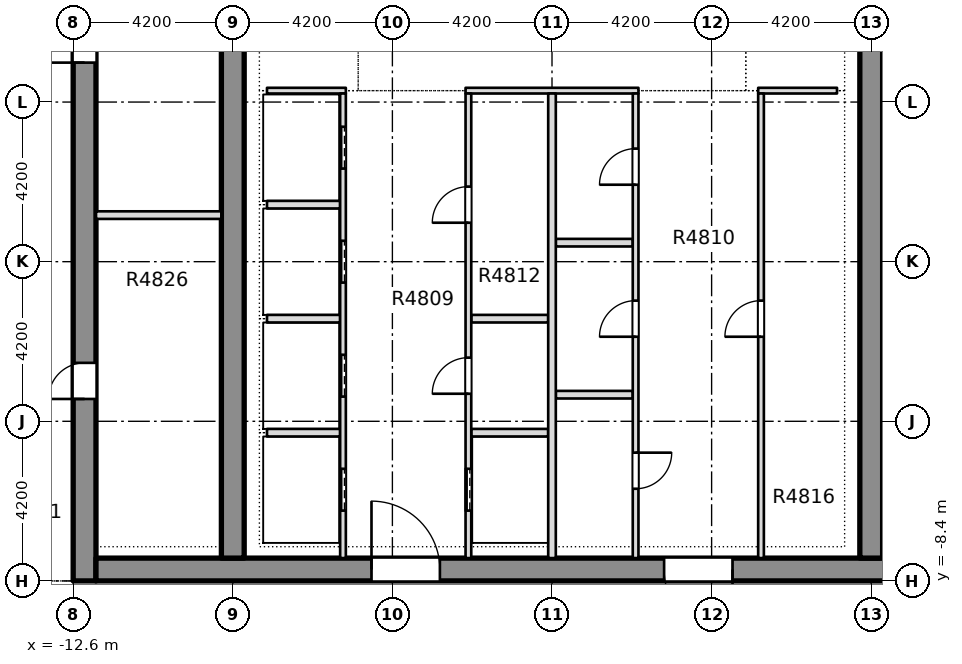
"""IFC4 building model, lengths in metres.
Left out: names, types, materials, properties, quantities, classifications, styles, units other than length and angle.
Written with IfcOpenShell. Run it as: python <this file> out.ifc"""

import sys

from ifc_helpers import new_model, si_unit, direction, frame, frame_2d, origin, place, context, subcontext, project, spatial, rectangle, extrude, element, fill, save


model = new_model("IFC4")
c1 = context("Model", 3, precision=1e-05, world=origin(), true_north=direction((0.0, 1.0)))
c2 = subcontext(c1, "Body", "Model", "MODEL_VIEW")
j1 = project(units=[si_unit("LENGTHUNIT", "METRE"), si_unit("PLANEANGLEUNIT", "RADIAN")], contexts=[c1])
p1 = place(None, origin())
s1 = spatial("IfcSite", under=j1, at=p1, CompositionType="ELEMENT")
p2 = place(p1, origin())
s2 = spatial("IfcBuilding", under=s1, at=p2, CompositionType="ELEMENT")
p3 = place(p2, frame((0.0, 0.0, 185.9)))
s3 = spatial("IfcBuildingStorey", under=s2, at=p3, CompositionType="ELEMENT", Elevation=185.9)
p4 = place(p3, frame((-12.3, -8.4, -0.4), z_axis=(0.0, 0.0, 1.0), x_axis=(0.0, 1.0, 0.0)))
e1 = element("IfcWall", 1, at=p4, inside=s3, PredefinedType="SHEAR", context=c2, shape_type="SweptSolid", body=[
    extrude(rectangle(XDim=30.15, YDim=0.6, at=frame_2d((15.075, 0.0))), origin(), (0.0, 0.0, 1.0), 3.45),
])
p5 = place(p4, frame((4.788, 0.0, 0.4)))
e2 = element("IfcOpeningElement", 2, at=p5, cuts=e1, PredefinedType="OPENING", context=c2, shape_type="SweptSolid", body=[
    extrude(rectangle(XDim=0.95, YDim=2.1, at=frame_2d((0.475, 1.05))), frame((0.0, 0.31, 0.0), z_axis=(0.0, -1.0, 0.0), x_axis=(1.0, 0.0, 0.0)), (0.0, 0.0, 1.0), 0.62),
])
p6 = place(p4, frame((13.638, 0.0, 0.4)))
e3 = element("IfcOpeningElement", 3, at=p6, cuts=e1, PredefinedType="OPENING", context=c2, shape_type="SweptSolid", body=[
    extrude(rectangle(XDim=0.95, YDim=2.1, at=frame_2d((0.475, 1.05))), frame((0.0, 0.31, 0.0), z_axis=(0.0, -1.0, 0.0), x_axis=(1.0, 0.0, 0.0)), (0.0, 0.0, 1.0), 0.62),
])
p7 = place(p4, frame((21.771, 0.0, 0.4)))
e4 = element("IfcOpeningElement", 4, at=p7, cuts=e1, PredefinedType="OPENING", context=c2, shape_type="SweptSolid", body=[
    extrude(rectangle(XDim=0.95, YDim=2.1, at=frame_2d((0.475, 1.05))), frame((0.0, 0.31, 0.0), z_axis=(0.0, -1.0, 0.0), x_axis=(1.0, 0.0, 0.0)), (0.0, 0.0, 1.0), 0.62),
])
p8 = place(p4, frame((24.576, 0.0, 0.4)))
e5 = element("IfcOpeningElement", 5, at=p8, cuts=e1, PredefinedType="OPENING", context=c2, shape_type="SweptSolid", body=[
    extrude(rectangle(XDim=0.95, YDim=2.1, at=frame_2d((0.475, 1.05))), frame((0.0, 0.31, 0.0), z_axis=(0.0, -1.0, 0.0), x_axis=(1.0, 0.0, 0.0)), (0.0, 0.0, 1.0), 0.62),
])
p9 = place(p4, frame((27.555, 0.0, 0.4)))
e6 = element("IfcOpeningElement", 6, at=p9, cuts=e1, PredefinedType="OPENING", context=c2, shape_type="SweptSolid", body=[
    extrude(rectangle(XDim=0.95, YDim=2.1, at=frame_2d((0.475, 1.05))), frame((0.0, 0.31, 0.0), z_axis=(0.0, -1.0, 0.0), x_axis=(1.0, 0.0, 0.0)), (0.0, 0.0, 1.0), 0.62),
])
p10 = place(p4, frame((19.3, 0.0, 0.4)))
e7 = element("IfcOpeningElement", 7, at=p10, cuts=e1, PredefinedType="OPENING", context=c2, shape_type="SweptSolid", body=[
    extrude(rectangle(XDim=1.2, YDim=2.1, at=frame_2d((0.6, 1.05))), frame((0.0, 0.31, 0.0), z_axis=(0.0, -1.0, 0.0), x_axis=(1.0, 0.0, 0.0)), (0.0, 0.0, 1.0), 0.62),
])
p11 = place(p3, frame((-12.0, -8.1, -0.4), z_axis=(0.0, 0.0, 1.0), x_axis=(1.0, 0.0, 0.0)))
e8 = element("IfcWall", 8, at=p11, inside=s3, PredefinedType="SHEAR", context=c2, shape_type="SweptSolid", body=[
    extrude(rectangle(XDim=24.0, YDim=0.6, at=frame_2d((12.0, 0.0))), origin(), (0.0, 0.0, 1.0), 3.45),
])
p12 = place(p11, frame((7.25, 0.0, 0.4)))
e9 = element("IfcOpeningElement", 9, at=p12, cuts=e8, PredefinedType="OPENING", context=c2, shape_type="SweptSolid", body=[
    extrude(rectangle(XDim=1.8, YDim=2.1, at=frame_2d((0.9, 1.05))), frame((0.0, 0.31, 0.0), z_axis=(0.0, -1.0, 0.0), x_axis=(1.0, 0.0, 0.0)), (0.0, 0.0, 1.0), 0.62),
])
p13 = place(p11, frame((14.95, 0.0, 0.4)))
e10 = element("IfcOpeningElement", 10, at=p13, cuts=e8, PredefinedType="OPENING", context=c2, shape_type="SweptSolid", body=[
    extrude(rectangle(XDim=1.8, YDim=2.1, at=frame_2d((0.9, 1.05))), frame((0.0, 0.31, 0.0), z_axis=(0.0, -1.0, 0.0), x_axis=(1.0, 0.0, 0.0)), (0.0, 0.0, 1.0), 0.62),
])
p14 = place(p3, frame((-8.4, -7.8, -0.4), z_axis=(0.0, 0.0, 1.0), x_axis=(0.0, 1.0, 0.0)))
e11 = element("IfcWall", 11, at=p14, inside=s3, PredefinedType="SHEAR", context=c2, shape_type="SweptSolid", body=[
    extrude(rectangle(XDim=28.95, YDim=0.6, at=frame_2d((14.475, 0.0))), origin(), (0.0, 0.0, 1.0), 3.45),
])
p15 = place(p14, frame((18.7, 0.0, 0.4)))
e12 = element("IfcOpeningElement", 12, at=p15, cuts=e11, PredefinedType="OPENING", context=c2, shape_type="SweptSolid", body=[
    extrude(rectangle(XDim=1.2, YDim=2.1, at=frame_2d((0.6, 1.05))), frame((0.0, 0.31, 0.0), z_axis=(0.0, -1.0, 0.0), x_axis=(1.0, 0.0, 0.0)), (0.0, 0.0, 1.0), 0.62),
])
p16 = place(p3, frame((8.4, -7.8, -0.4), z_axis=(0.0, 0.0, 1.0), x_axis=(0.0, 1.0, 0.0)))
e13 = element("IfcWall", 13, at=p16, inside=s3, PredefinedType="SHEAR", context=c2, shape_type="SweptSolid", body=[
    extrude(rectangle(XDim=28.95, YDim=0.6, at=frame_2d((14.475, 0.0))), origin(), (0.0, 0.0, 1.0), 3.45),
])
p17 = place(p16, frame((18.7, 0.0, 0.4)))
e14 = element("IfcOpeningElement", 14, at=p17, cuts=e13, PredefinedType="OPENING", context=c2, shape_type="SweptSolid", body=[
    extrude(rectangle(XDim=1.2, YDim=2.1, at=frame_2d((0.6, 1.05))), frame((0.0, 0.31, 0.0), z_axis=(0.0, -1.0, 0.0), x_axis=(1.0, 0.0, 0.0)), (0.0, 0.0, 1.0), 0.62),
])
p18 = place(p3, frame((-7.5, -4.5, 0.0), z_axis=(0.0, 0.0, 1.0), x_axis=(1.0, 0.0, 0.0)))
e15 = element("IfcWall", 15, at=p18, inside=s3, PredefinedType="PARTITIONING", context=c2, shape_type="SweptSolid", body=[
    extrude(rectangle(XDim=1.925, YDim=0.2, at=frame_2d((0.962, 0.0))), origin(), (0.0, 0.0, 1.0), 3.05),
])
for number, where, z_axis, x_axis in (
    (16, (-2.125, -4.5, 0.0), (0.0, 0.0, 1.0), (1.0, 0.0, 0.0)),
    (17, (0.1, -3.5, 0.0), (0.0, 0.0, 1.0), (1.0, 0.0, 0.0)),
):
    element("IfcWall", number, at=place(p3, frame(where, z_axis=z_axis, x_axis=x_axis)), inside=s3, PredefinedType="PARTITIONING", context=c2, shape_type="SweptSolid", body=[
        extrude(rectangle(XDim=2.025, YDim=0.2, at=frame_2d((1.012, 0.0))), origin(), (0.0, 0.0, 1.0), 3.05),
    ])
p19 = place(p3, frame((-7.5, -1.5, 0.0), z_axis=(0.0, 0.0, 1.0), x_axis=(1.0, 0.0, 0.0)))
e18 = element("IfcWall", 18, at=p19, inside=s3, PredefinedType="PARTITIONING", context=c2, shape_type="SweptSolid", body=[
    extrude(rectangle(XDim=1.925, YDim=0.2, at=frame_2d((0.962, 0.0))), origin(), (0.0, 0.0, 1.0), 3.05),
])
for number, where, z_axis, x_axis in (
    (19, (-2.125, -1.5, 0.0), (0.0, 0.0, 1.0), (1.0, 0.0, 0.0)),
    (20, (0.1, 0.5, 0.0), (0.0, 0.0, 1.0), (1.0, 0.0, 0.0)),
):
    element("IfcWall", number, at=place(p3, frame(where, z_axis=z_axis, x_axis=x_axis)), inside=s3, PredefinedType="PARTITIONING", context=c2, shape_type="SweptSolid", body=[
        extrude(rectangle(XDim=2.025, YDim=0.2, at=frame_2d((1.012, 0.0))), origin(), (0.0, 0.0, 1.0), 3.05),
    ])
p20 = place(p3, frame((-7.5, 1.5, 0.0), z_axis=(0.0, 0.0, 1.0), x_axis=(1.0, 0.0, 0.0)))
e21 = element("IfcWall", 21, at=p20, inside=s3, PredefinedType="PARTITIONING", context=c2, shape_type="SweptSolid", body=[
    extrude(rectangle(XDim=1.925, YDim=0.2, at=frame_2d((0.962, 0.0))), origin(), (0.0, 0.0, 1.0), 3.05),
])
p21 = place(p3, frame((-7.5, 4.5, 0.0), z_axis=(0.0, 0.0, 1.0), x_axis=(1.0, 0.0, 0.0)))
e22 = element("IfcWall", 22, at=p21, inside=s3, PredefinedType="PARTITIONING", context=c2, shape_type="SweptSolid", body=[
    extrude(rectangle(XDim=2.075, YDim=0.15, at=frame_2d((1.038, 0.0))), origin(), (0.0, 0.0, 1.0), 3.05),
])
p22 = place(p3, frame((-2.275, 4.5, 0.0), z_axis=(0.0, 0.0, 1.0), x_axis=(1.0, 0.0, 0.0)))
e23 = element("IfcWall", 23, at=p22, inside=s3, PredefinedType="PARTITIONING", context=c2, shape_type="SweptSolid", body=[
    extrude(rectangle(XDim=4.55, YDim=0.15, at=frame_2d((2.275, 0.0))), origin(), (0.0, 0.0, 1.0), 3.05),
])
p23 = place(p3, frame((5.425, 4.5, 0.0), z_axis=(0.0, 0.0, 1.0), x_axis=(1.0, 0.0, 0.0)))
e24 = element("IfcWall", 24, at=p23, inside=s3, PredefinedType="PARTITIONING", context=c2, shape_type="SweptSolid", body=[
    extrude(rectangle(XDim=2.075, YDim=0.15, at=frame_2d((1.038, 0.0))), origin(), (0.0, 0.0, 1.0), 3.05),
])
p24 = place(p3, frame((-5.5, -7.799, 0.0), z_axis=(0.0, 0.0, 1.0), x_axis=(0.0, 1.0, 0.0)))
e25 = element("IfcWall", 25, at=p24, inside=s3, PredefinedType="PARTITIONING", context=c2, shape_type="SweptSolid", body=[
    extrude(rectangle(XDim=12.224, YDim=0.15, at=frame_2d((6.112, 0.0))), origin(), (0.0, 0.0, 1.0), 3.05),
])
p25 = place(p24, frame((1.249, 0.0, 0.0)))
e26 = element("IfcOpeningElement", 26, at=p25, cuts=e25, PredefinedType="OPENING", context=c2, shape_type="SweptSolid", body=[
    extrude(rectangle(XDim=1.1, YDim=2.1, at=frame_2d((0.55, 1.05))), frame((0.0, 0.085, 0.0), z_axis=(0.0, -1.0, 0.0), x_axis=(1.0, 0.0, 0.0)), (0.0, 0.0, 1.0), 0.17),
])
p26 = place(p24, frame((4.249, 0.0, 0.0)))
e27 = element("IfcOpeningElement", 27, at=p26, cuts=e25, PredefinedType="OPENING", context=c2, shape_type="SweptSolid", body=[
    extrude(rectangle(XDim=1.1, YDim=2.1, at=frame_2d((0.55, 1.05))), frame((0.0, 0.085, 0.0), z_axis=(0.0, -1.0, 0.0), x_axis=(1.0, 0.0, 0.0)), (0.0, 0.0, 1.0), 0.17),
])
p27 = place(p24, frame((7.249, 0.0, 0.0)))
e28 = element("IfcOpeningElement", 28, at=p27, cuts=e25, PredefinedType="OPENING", context=c2, shape_type="SweptSolid", body=[
    extrude(rectangle(XDim=1.1, YDim=2.1, at=frame_2d((0.55, 1.05))), frame((0.0, 0.085, 0.0), z_axis=(0.0, -1.0, 0.0), x_axis=(1.0, 0.0, 0.0)), (0.0, 0.0, 1.0), 0.17),
])
p28 = place(p24, frame((10.249, 0.0, 0.0)))
e29 = element("IfcOpeningElement", 29, at=p28, cuts=e25, PredefinedType="OPENING", context=c2, shape_type="SweptSolid", body=[
    extrude(rectangle(XDim=1.1, YDim=2.1, at=frame_2d((0.55, 1.05))), frame((0.0, 0.085, 0.0), z_axis=(0.0, -1.0, 0.0), x_axis=(1.0, 0.0, 0.0)), (0.0, 0.0, 1.0), 0.17),
])
p29 = place(p3, frame((-2.2, -7.799, 0.0), z_axis=(0.0, 0.0, 1.0), x_axis=(0.0, 1.0, 0.0)))
e30 = element("IfcWall", 30, at=p29, inside=s3, PredefinedType="PARTITIONING", context=c2, shape_type="SweptSolid", body=[
    extrude(rectangle(XDim=12.224, YDim=0.15, at=frame_2d((6.112, 0.0))), origin(), (0.0, 0.0, 1.0), 3.05),
])
p30 = place(p29, frame((1.249, 0.0, 0.0)))
e31 = element("IfcOpeningElement", 31, at=p30, cuts=e30, PredefinedType="OPENING", context=c2, shape_type="SweptSolid", body=[
    extrude(rectangle(XDim=1.1, YDim=2.1, at=frame_2d((0.55, 1.05))), frame((0.0, 0.085, 0.0), z_axis=(0.0, -1.0, 0.0), x_axis=(1.0, 0.0, 0.0)), (0.0, 0.0, 1.0), 0.17),
])
p31 = place(p29, frame((4.324, 0.0, 0.0)))
e32 = element("IfcOpeningElement", 32, at=p31, cuts=e30, PredefinedType="OPENING", context=c2, shape_type="SweptSolid", body=[
    extrude(rectangle(XDim=0.95, YDim=2.1, at=frame_2d((0.475, 1.05))), frame((0.0, 0.085, 0.0), z_axis=(0.0, -1.0, 0.0), x_axis=(1.0, 0.0, 0.0)), (0.0, 0.0, 1.0), 0.17),
])
p32 = place(p29, frame((8.824, 0.0, 0.0)))
e33 = element("IfcOpeningElement", 33, at=p32, cuts=e30, PredefinedType="OPENING", context=c2, shape_type="SweptSolid", body=[
    extrude(rectangle(XDim=0.95, YDim=2.1, at=frame_2d((0.475, 1.05))), frame((0.0, 0.085, 0.0), z_axis=(0.0, -1.0, 0.0), x_axis=(1.0, 0.0, 0.0)), (0.0, 0.0, 1.0), 0.17),
])
p33 = place(p3, frame((0.0, -7.799, 0.0), z_axis=(0.0, 0.0, 1.0), x_axis=(0.0, 1.0, 0.0)))
e34 = element("IfcWall", 34, at=p33, inside=s3, PredefinedType="PARTITIONING", context=c2, shape_type="SweptSolid", body=[
    extrude(rectangle(XDim=12.224, YDim=0.2, at=frame_2d((6.112, 0.0))), origin(), (0.0, 0.0, 1.0), 3.05),
])
p34 = place(p3, frame((2.2, -7.799, 0.0), z_axis=(0.0, 0.0, 1.0), x_axis=(0.0, 1.0, 0.0)))
e35 = element("IfcWall", 35, at=p34, inside=s3, PredefinedType="PARTITIONING", context=c2, shape_type="SweptSolid", body=[
    extrude(rectangle(XDim=12.224, YDim=0.15, at=frame_2d((6.112, 0.0))), origin(), (0.0, 0.0, 1.0), 3.05),
])
p35 = place(p34, frame((1.824, 0.0, 0.0)))
e36 = element("IfcOpeningElement", 36, at=p35, cuts=e35, PredefinedType="OPENING", context=c2, shape_type="SweptSolid", body=[
    extrude(rectangle(XDim=0.95, YDim=2.1, at=frame_2d((0.475, 1.05))), frame((0.0, 0.085, 0.0), z_axis=(0.0, -1.0, 0.0), x_axis=(1.0, 0.0, 0.0)), (0.0, 0.0, 1.0), 0.17),
])
p36 = place(p34, frame((5.824, 0.0, 0.0)))
e37 = element("IfcOpeningElement", 37, at=p36, cuts=e35, PredefinedType="OPENING", context=c2, shape_type="SweptSolid", body=[
    extrude(rectangle(XDim=0.95, YDim=2.1, at=frame_2d((0.475, 1.05))), frame((0.0, 0.085, 0.0), z_axis=(0.0, -1.0, 0.0), x_axis=(1.0, 0.0, 0.0)), (0.0, 0.0, 1.0), 0.17),
])
p37 = place(p34, frame((9.824, 0.0, 0.0)))
e38 = element("IfcOpeningElement", 38, at=p37, cuts=e35, PredefinedType="OPENING", context=c2, shape_type="SweptSolid", body=[
    extrude(rectangle(XDim=0.95, YDim=2.1, at=frame_2d((0.475, 1.05))), frame((0.0, 0.085, 0.0), z_axis=(0.0, -1.0, 0.0), x_axis=(1.0, 0.0, 0.0)), (0.0, 0.0, 1.0), 0.17),
])
p38 = place(p3, frame((5.5, -7.799, 0.0), z_axis=(0.0, 0.0, 1.0), x_axis=(0.0, 1.0, 0.0)))
e39 = element("IfcWall", 39, at=p38, inside=s3, PredefinedType="PARTITIONING", context=c2, shape_type="SweptSolid", body=[
    extrude(rectangle(XDim=12.224, YDim=0.15, at=frame_2d((6.112, 0.0))), origin(), (0.0, 0.0, 1.0), 3.05),
])
p39 = place(p38, frame((5.824, 0.0, 0.0)))
e40 = element("IfcOpeningElement", 40, at=p39, cuts=e39, PredefinedType="OPENING", context=c2, shape_type="SweptSolid", body=[
    extrude(rectangle(XDim=0.95, YDim=2.1, at=frame_2d((0.475, 1.05))), frame((0.0, 0.085, 0.0), z_axis=(0.0, -1.0, 0.0), x_axis=(1.0, 0.0, 0.0)), (0.0, 0.0, 1.0), 0.17),
])
p40 = place(p3, frame((-11.999, 1.225, 0.0), z_axis=(0.0, 0.0, 1.0), x_axis=(1.0, 0.0, 0.0)))
e41 = element("IfcWall", 41, at=p40, inside=s3, PredefinedType="PARTITIONING", context=c2, shape_type="SweptSolid", body=[
    extrude(rectangle(XDim=3.298, YDim=0.2, at=frame_2d((1.649, 0.0))), origin(), (0.0, 0.0, 1.0), 3.05),
])
p41 = place(p25, origin())
e42 = element("IfcDoor", 42, at=p41, inside=s3, OperationType="SLIDING_TO_LEFT", PredefinedType="DOOR", context=c2, shape_type="SweptSolid", body=[
    extrude(rectangle(XDim=1.1, YDim=2.1, at=frame_2d((0.55, 1.05))), frame((0.0, 0.025, 0.0), z_axis=(0.0, -1.0, 0.0), x_axis=(1.0, 0.0, 0.0)), (0.0, 0.0, 1.0), 0.05),
])
fill(e26, e42)
p42 = place(p26, origin())
e43 = element("IfcDoor", 43, at=p42, inside=s3, OperationType="SLIDING_TO_LEFT", PredefinedType="DOOR", context=c2, shape_type="SweptSolid", body=[
    extrude(rectangle(XDim=1.1, YDim=2.1, at=frame_2d((0.55, 1.05))), frame((0.0, 0.025, 0.0), z_axis=(0.0, -1.0, 0.0), x_axis=(1.0, 0.0, 0.0)), (0.0, 0.0, 1.0), 0.05),
])
fill(e27, e43)
p43 = place(p27, origin())
e44 = element("IfcDoor", 44, at=p43, inside=s3, OperationType="SLIDING_TO_LEFT", PredefinedType="DOOR", context=c2, shape_type="SweptSolid", body=[
    extrude(rectangle(XDim=1.1, YDim=2.1, at=frame_2d((0.55, 1.05))), frame((0.0, 0.025, 0.0), z_axis=(0.0, -1.0, 0.0), x_axis=(1.0, 0.0, 0.0)), (0.0, 0.0, 1.0), 0.05),
])
fill(e28, e44)
p44 = place(p28, origin())
e45 = element("IfcDoor", 45, at=p44, inside=s3, OperationType="SLIDING_TO_LEFT", PredefinedType="DOOR", context=c2, shape_type="SweptSolid", body=[
    extrude(rectangle(XDim=1.1, YDim=2.1, at=frame_2d((0.55, 1.05))), frame((0.0, 0.025, 0.0), z_axis=(0.0, -1.0, 0.0), x_axis=(1.0, 0.0, 0.0)), (0.0, 0.0, 1.0), 0.05),
])
fill(e29, e45)
p45 = place(p30, origin())
e46 = element("IfcDoor", 46, at=p45, inside=s3, OperationType="SLIDING_TO_LEFT", PredefinedType="DOOR", context=c2, shape_type="SweptSolid", body=[
    extrude(rectangle(XDim=1.1, YDim=2.1, at=frame_2d((0.55, 1.05))), frame((0.0, 0.025, 0.0), z_axis=(0.0, -1.0, 0.0), x_axis=(1.0, 0.0, 0.0)), (0.0, 0.0, 1.0), 0.05),
])
fill(e31, e46)
p46 = place(p31, origin())
e47 = element("IfcDoor", 47, at=p46, inside=s3, OperationType="SINGLE_SWING_RIGHT", PredefinedType="DOOR", context=c2, shape_type="SweptSolid", body=[
    extrude(rectangle(XDim=0.95, YDim=2.1, at=frame_2d((0.475, 1.05))), frame((0.0, 0.025, 0.0), z_axis=(0.0, -1.0, 0.0), x_axis=(1.0, 0.0, 0.0)), (0.0, 0.0, 1.0), 0.05),
])
fill(e32, e47)
p47 = place(p32, origin())
e48 = element("IfcDoor", 48, at=p47, inside=s3, OperationType="SINGLE_SWING_LEFT", PredefinedType="DOOR", context=c2, shape_type="SweptSolid", body=[
    extrude(rectangle(XDim=0.95, YDim=2.1, at=frame_2d((0.475, 1.05))), frame((0.0, 0.025, 0.0), z_axis=(0.0, -1.0, 0.0), x_axis=(1.0, 0.0, 0.0)), (0.0, 0.0, 1.0), 0.05),
])
fill(e33, e48)
p48 = place(p35, origin())
e49 = element("IfcDoor", 49, at=p48, inside=s3, OperationType="SINGLE_SWING_RIGHT", PredefinedType="DOOR", context=c2, shape_type="SweptSolid", body=[
    extrude(rectangle(XDim=0.95, YDim=2.1, at=frame_2d((0.475, 1.05))), frame((0.0, 0.025, 0.0), z_axis=(0.0, -1.0, 0.0), x_axis=(1.0, 0.0, 0.0)), (0.0, 0.0, 1.0), 0.05),
])
fill(e36, e49)
p49 = place(p36, origin())
e50 = element("IfcDoor", 50, at=p49, inside=s3, OperationType="SINGLE_SWING_RIGHT", PredefinedType="DOOR", context=c2, shape_type="SweptSolid", body=[
    extrude(rectangle(XDim=0.95, YDim=2.1, at=frame_2d((0.475, 1.05))), frame((0.0, 0.025, 0.0), z_axis=(0.0, -1.0, 0.0), x_axis=(1.0, 0.0, 0.0)), (0.0, 0.0, 1.0), 0.05),
])
fill(e37, e50)
p50 = place(p37, origin())
e51 = element("IfcDoor", 51, at=p50, inside=s3, OperationType="SINGLE_SWING_LEFT", PredefinedType="DOOR", context=c2, shape_type="SweptSolid", body=[
    extrude(rectangle(XDim=0.95, YDim=2.1, at=frame_2d((0.475, 1.05))), frame((0.0, 0.025, 0.0), z_axis=(0.0, -1.0, 0.0), x_axis=(1.0, 0.0, 0.0)), (0.0, 0.0, 1.0), 0.05),
])
fill(e38, e51)
p51 = place(p39, origin())
e52 = element("IfcDoor", 52, at=p51, inside=s3, OperationType="SINGLE_SWING_LEFT", PredefinedType="DOOR", context=c2, shape_type="SweptSolid", body=[
    extrude(rectangle(XDim=0.95, YDim=2.1, at=frame_2d((0.475, 1.05))), frame((0.0, 0.025, 0.0), z_axis=(0.0, -1.0, 0.0), x_axis=(1.0, 0.0, 0.0)), (0.0, 0.0, 1.0), 0.05),
])
fill(e40, e52)
p52 = place(p12, origin())
e53 = element("IfcDoor", 53, at=p52, inside=s3, OperationType="SINGLE_SWING_LEFT", PredefinedType="DOOR", context=c2, shape_type="SweptSolid", body=[
    extrude(rectangle(XDim=1.8, YDim=2.1, at=frame_2d((0.9, 1.05))), frame((0.0, 0.025, 0.0), z_axis=(0.0, -1.0, 0.0), x_axis=(1.0, 0.0, 0.0)), (0.0, 0.0, 1.0), 0.05),
])
fill(e9, e53)
p53 = place(p13, origin())
e54 = element("IfcDoor", 54, at=p53, inside=s3, OperationType="SINGLE_SWING_LEFT", PredefinedType="DOOR", context=c2, shape_type="SweptSolid", body=[
    extrude(rectangle(XDim=1.8, YDim=2.1, at=frame_2d((0.9, 1.05))), frame((0.0, 0.025, 0.0), z_axis=(0.0, -1.0, 0.0), x_axis=(1.0, 0.0, 0.0)), (0.0, 0.0, 1.0), 0.05),
])
fill(e10, e54)
p54 = place(p5, origin())
e55 = element("IfcDoor", 55, at=p54, inside=s3, OperationType="SINGLE_SWING_LEFT", PredefinedType="DOOR", context=c2, shape_type="SweptSolid", body=[
    extrude(rectangle(XDim=0.95, YDim=2.1, at=frame_2d((0.475, 1.05))), frame((0.0, 0.025, 0.0), z_axis=(0.0, -1.0, 0.0), x_axis=(1.0, 0.0, 0.0)), (0.0, 0.0, 1.0), 0.05),
])
fill(e2, e55)
p55 = place(p6, origin())
e56 = element("IfcDoor", 56, at=p55, inside=s3, OperationType="SINGLE_SWING_LEFT", PredefinedType="DOOR", context=c2, shape_type="SweptSolid", body=[
    extrude(rectangle(XDim=0.95, YDim=2.1, at=frame_2d((0.475, 1.05))), frame((0.0, 0.025, 0.0), z_axis=(0.0, -1.0, 0.0), x_axis=(1.0, 0.0, 0.0)), (0.0, 0.0, 1.0), 0.05),
])
fill(e3, e56)
save(model, sys.argv[1])
